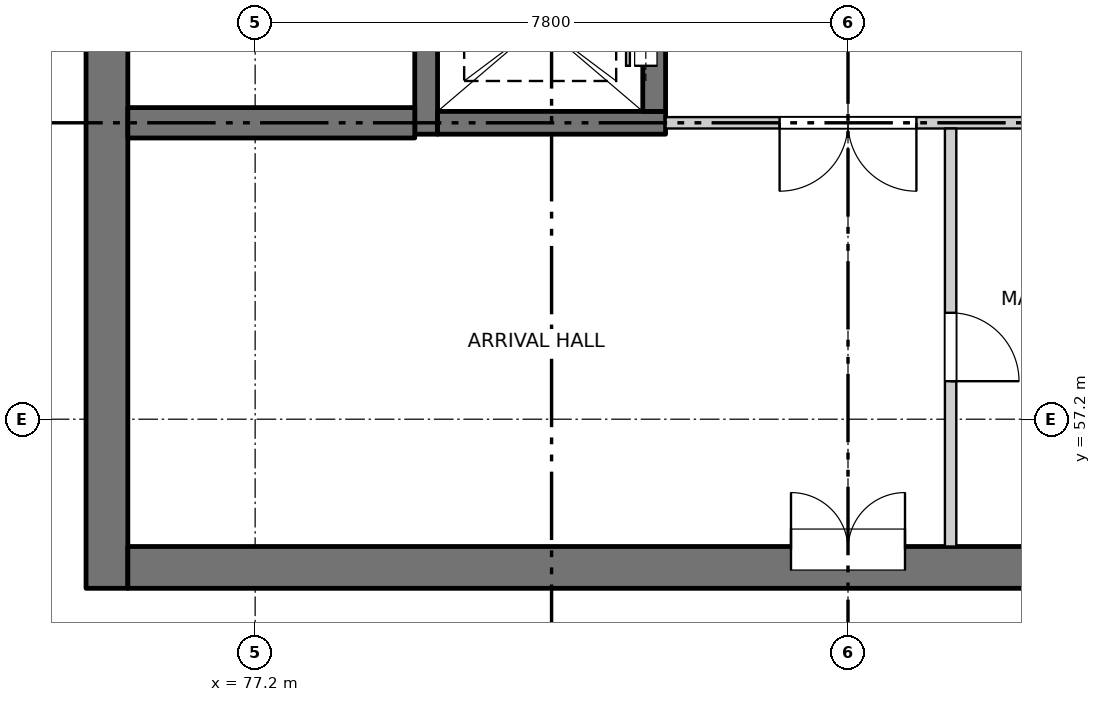
"""IFC4 building model, lengths in metres.
Left out: names, types, materials, properties, quantities, classifications, styles, units other than length and angle.
Written with IfcOpenShell. Run it as: python <this file> out.ifc"""

import sys

from ifc_helpers import new_model, si_unit, direction, frame, frame_2d, origin, place, context, subcontext, project, spatial, rectangle, extrude, element, fill, save


model = new_model("IFC4")
c1 = context("Model", 3, precision=1e-05, world=origin(), true_north=direction((0.0, 1.0)))
c2 = subcontext(c1, "Body", "Model", "MODEL_VIEW")
j1 = project(units=[si_unit("LENGTHUNIT", "METRE"), si_unit("PLANEANGLEUNIT", "RADIAN")], contexts=[c1])
p1 = place(None, origin())
s1 = spatial("IfcSite", under=j1, at=p1, CompositionType="ELEMENT")
p2 = place(p1, origin())
s2 = spatial("IfcBuilding", under=s1, at=p2, CompositionType="ELEMENT")
p3 = place(p2, frame((0.0, 0.0, 123.7)))
s3 = spatial("IfcBuildingStorey", under=s2, at=p3, CompositionType="ELEMENT", Elevation=123.7)
p4 = place(p3, frame((75.25, 54.975, -0.3), z_axis=(0.0, 0.0, 1.0), x_axis=(0.0, 1.0, 0.0)))
e1 = element("IfcWall", 1, at=p4, inside=s3, PredefinedType="SOLIDWALL", context=c2, shape_type="SweptSolid", body=[
    extrude(rectangle(XDim=22.325, YDim=0.55, at=frame_2d((11.163, 0.0))), origin(), (0.0, 0.0, 1.0), 3.45),
])
p5 = place(p4, frame((7.475, 0.0, 0.3)))
e2 = element("IfcOpeningElement", 2, at=p5, cuts=e1, PredefinedType="OPENING", context=c2, shape_type="SweptSolid", body=[
    extrude(rectangle(XDim=0.9, YDim=2.1, at=frame_2d((0.45, 1.05))), frame((0.0, 0.285, 0.0), z_axis=(0.0, -1.0, 0.0), x_axis=(1.0, 0.0, 0.0)), (0.0, 0.0, 1.0), 0.57),
])
p6 = place(p4, frame((10.775, 0.0, 0.3)))
e3 = element("IfcOpeningElement", 3, at=p6, cuts=e1, PredefinedType="OPENING", context=c2, shape_type="SweptSolid", body=[
    extrude(rectangle(XDim=0.9, YDim=2.1, at=frame_2d((0.45, 1.05))), frame((0.0, 0.285, 0.0), z_axis=(0.0, -1.0, 0.0), x_axis=(1.0, 0.0, 0.0)), (0.0, 0.0, 1.0), 0.57),
])
p7 = place(p4, frame((13.775, 0.0, 0.3)))
e4 = element("IfcOpeningElement", 4, at=p7, cuts=e1, PredefinedType="OPENING", context=c2, shape_type="SweptSolid", body=[
    extrude(rectangle(XDim=0.9, YDim=2.1, at=frame_2d((0.45, 1.05))), frame((0.0, 0.285, 0.0), z_axis=(0.0, -1.0, 0.0), x_axis=(1.0, 0.0, 0.0)), (0.0, 0.0, 1.0), 0.57),
])
p8 = place(p4, frame((16.775, 0.0, 0.3)))
e5 = element("IfcOpeningElement", 5, at=p8, cuts=e1, PredefinedType="OPENING", context=c2, shape_type="SweptSolid", body=[
    extrude(rectangle(XDim=0.9, YDim=2.1, at=frame_2d((0.45, 1.05))), frame((0.0, 0.285, 0.0), z_axis=(0.0, -1.0, 0.0), x_axis=(1.0, 0.0, 0.0)), (0.0, 0.0, 1.0), 0.57),
])
p9 = place(p4, frame((20.075, 0.0, 0.3)))
e6 = element("IfcOpeningElement", 6, at=p9, cuts=e1, PredefinedType="OPENING", context=c2, shape_type="SweptSolid", body=[
    extrude(rectangle(XDim=0.9, YDim=2.1, at=frame_2d((0.45, 1.05))), frame((0.0, 0.285, 0.0), z_axis=(0.0, -1.0, 0.0), x_axis=(1.0, 0.0, 0.0)), (0.0, 0.0, 1.0), 0.57),
])
p10 = place(p3, frame((75.525, 55.25, -0.3), z_axis=(0.0, 0.0, 1.0), x_axis=(1.0, 0.0, 0.0)))
e7 = element("IfcWall", 7, at=p10, inside=s3, PredefinedType="SOLIDWALL", context=c2, shape_type="SweptSolid", body=[
    extrude(rectangle(XDim=18.95, YDim=0.55, at=frame_2d((9.475, 0.0))), origin(), (0.0, 0.0, 1.0), 3.45),
])
p11 = place(p10, frame((8.725, 0.0, 0.3)))
e8 = element("IfcOpeningElement", 8, at=p11, cuts=e7, PredefinedType="OPENING", context=c2, shape_type="SweptSolid", body=[
    extrude(rectangle(XDim=1.5, YDim=2.1, at=frame_2d((0.75, 1.05))), frame((0.0, 0.285, 0.0), z_axis=(0.0, -1.0, 0.0), x_axis=(1.0, 0.0, 0.0)), (0.0, 0.0, 1.0), 0.57),
])
p12 = place(p3, frame((79.45, 60.95, -0.3), z_axis=(0.0, 0.0, 1.0), x_axis=(0.0, 1.0, 0.0)))
e9 = element("IfcWall", 9, at=p12, inside=s3, PredefinedType="SOLIDWALL", context=c2, shape_type="SweptSolid", body=[
    extrude(rectangle(XDim=16.35, YDim=0.3, at=frame_2d((8.175, 0.0))), origin(), (0.0, 0.0, 1.0), 3.45),
])
p13 = place(p3, frame((79.6, 61.1, -0.3), z_axis=(0.0, 0.0, 1.0), x_axis=(1.0, 0.0, 0.0)))
e10 = element("IfcWall", 10, at=p13, inside=s3, PredefinedType="SOLIDWALL", context=c2, shape_type="SweptSolid", body=[
    extrude(rectangle(XDim=3.0, YDim=0.3, at=frame_2d((1.5, 0.0))), origin(), (0.0, 0.0, 1.0), 3.45),
])
p14 = place(p3, frame((82.45, 61.25, -0.3), z_axis=(0.0, 0.0, 1.0), x_axis=(0.0, 1.0, 0.0)))
e11 = element("IfcWall", 11, at=p14, inside=s3, PredefinedType="SOLIDWALL", context=c2, shape_type="SweptSolid", body=[
    extrude(rectangle(XDim=2.3, YDim=0.3, at=frame_2d((1.15, 0.0))), origin(), (0.0, 0.0, 1.0), 3.45),
])
p15 = place(p14, frame((0.6, 0.0, 0.3)))
e12 = element("IfcOpeningElement", 12, at=p15, cuts=e11, PredefinedType="OPENING", context=c2, shape_type="SweptSolid", body=[
    extrude(rectangle(XDim=1.1, YDim=2.1, at=frame_2d((0.55, 1.05))), frame((0.0, 0.16, 0.0), z_axis=(0.0, -1.0, 0.0), x_axis=(1.0, 0.0, 0.0)), (0.0, 0.0, 1.0), 0.32),
])
p16 = place(p3, frame((75.525, 61.1, -0.3), z_axis=(0.0, 0.0, 1.0), x_axis=(1.0, 0.0, 0.0)))
e13 = element("IfcWall", 13, at=p16, inside=s3, PredefinedType="SOLIDWALL", context=c2, shape_type="SweptSolid", body=[
    extrude(rectangle(XDim=3.775, YDim=0.4, at=frame_2d((1.888, 0.0))), origin(), (0.0, 0.0, 1.0), 3.45),
])
p17 = place(p3, frame((82.6, 61.1, 0.0), z_axis=(0.0, 0.0, 1.0), x_axis=(1.0, 0.0, 0.0)))
e14 = element("IfcWall", 14, at=p17, inside=s3, PredefinedType="PARTITIONING", context=c2, shape_type="SweptSolid", body=[
    extrude(rectangle(XDim=4.8, YDim=0.15, at=frame_2d((2.4, 0.0))), origin(), (0.0, 0.0, 1.0), 3.15),
])
p18 = place(p17, frame((1.5, 0.0, 0.0)))
e15 = element("IfcOpeningElement", 15, at=p18, cuts=e14, PredefinedType="OPENING", context=c2, shape_type="SweptSolid", body=[
    extrude(rectangle(XDim=1.8, YDim=2.1, at=frame_2d((0.9, 1.05))), frame((0.0, 0.085, 0.0), z_axis=(0.0, -1.0, 0.0), x_axis=(1.0, 0.0, 0.0)), (0.0, 0.0, 1.0), 0.17),
])
p19 = place(p3, frame((86.35, 55.525, 0.0), z_axis=(0.0, 0.0, 1.0), x_axis=(0.0, 1.0, 0.0)))
e16 = element("IfcWall", 16, at=p19, inside=s3, PredefinedType="PARTITIONING", context=c2, shape_type="SweptSolid", body=[
    extrude(rectangle(XDim=5.5, YDim=0.15, at=frame_2d((2.75, 0.0))), origin(), (0.0, 0.0, 1.0), 3.15),
])
p20 = place(p19, frame((2.175, 0.0, 0.0)))
e17 = element("IfcOpeningElement", 17, at=p20, cuts=e16, PredefinedType="OPENING", context=c2, shape_type="SweptSolid", body=[
    extrude(rectangle(XDim=0.9, YDim=2.1, at=frame_2d((0.45, 1.05))), frame((0.0, 0.085, 0.0), z_axis=(0.0, -1.0, 0.0), x_axis=(1.0, 0.0, 0.0)), (0.0, 0.0, 1.0), 0.17),
])
p21 = place(p11, origin())
e18 = element("IfcDoor", 18, at=p21, inside=s3, OperationType="DOUBLE_DOOR_SINGLE_SWING", PredefinedType="DOOR", context=c2, shape_type="SweptSolid", body=[
    extrude(rectangle(XDim=1.5, YDim=2.1, at=frame_2d((0.75, 1.05))), frame((0.0, 0.26, 0.0), z_axis=(0.0, -1.0, 0.0), x_axis=(1.0, 0.0, 0.0)), (0.0, 0.0, 1.0), 0.05),
])
fill(e8, e18)
p22 = place(p20, origin())
e19 = element("IfcDoor", 19, at=p22, inside=s3, OperationType="SINGLE_SWING_RIGHT", PredefinedType="DOOR", context=c2, shape_type="SweptSolid", body=[
    extrude(rectangle(XDim=0.9, YDim=2.1, at=frame_2d((0.45, 1.05))), frame((0.0, 0.025, 0.0), z_axis=(0.0, -1.0, 0.0), x_axis=(1.0, 0.0, 0.0)), (0.0, 0.0, 1.0), 0.05),
])
fill(e17, e19)
p23 = place(p18, origin())
e20 = element("IfcDoor", 20, at=p23, inside=s3, OperationType="DOUBLE_DOOR_SINGLE_SWING", PredefinedType="DOOR", context=c2, shape_type="SweptSolid", body=[
    extrude(rectangle(XDim=1.8, YDim=2.1, at=frame_2d((0.9, 1.05))), frame((0.0, 0.025, 0.0), z_axis=(0.0, -1.0, 0.0), x_axis=(1.0, 0.0, 0.0)), (0.0, 0.0, 1.0), 0.05),
])
fill(e15, e20)
p24 = place(p15, origin())
e21 = element("IfcDoor", 21, at=p24, inside=s3, OperationType="SLIDING_TO_RIGHT", PredefinedType="DOOR", context=c2, shape_type="SweptSolid", body=[
    extrude(rectangle(XDim=1.1, YDim=2.1, at=frame_2d((0.55, 1.05))), frame((0.0, 0.135, 0.0), z_axis=(0.0, -1.0, 0.0), x_axis=(1.0, 0.0, 0.0)), (0.0, 0.0, 1.0), 0.05),
])
fill(e12, e21)
save(model, sys.argv[1])
